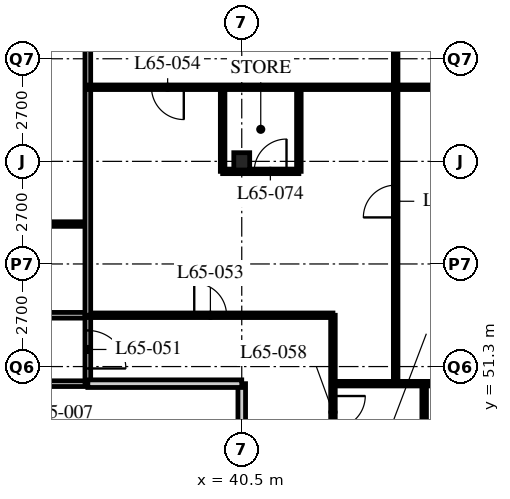
"""IFC4 building model, lengths in metres.
Left out: names, types, materials, properties, quantities, classifications, styles, units other than length and angle.
Written with IfcOpenShell. Run it as: python <this file> out.ifc"""

import sys

from ifc_helpers import new_model, si_unit, direction, frame, frame_2d, origin, origin_2d, place, context, subcontext, project, spatial, rectangle, i_section, extrude, element, fill, save


model = new_model("IFC4")
c1 = context("Model", 3, precision=1e-05, world=origin(), true_north=direction((0.0, 1.0)))
c2 = subcontext(c1, "Body", "Model", "MODEL_VIEW")
j1 = project(units=[si_unit("LENGTHUNIT", "METRE"), si_unit("PLANEANGLEUNIT", "RADIAN")], contexts=[c1])
p1 = place(None, origin())
s1 = spatial("IfcSite", under=j1, at=p1, CompositionType="ELEMENT")
p2 = place(p1, origin())
s2 = spatial("IfcBuilding", under=s1, at=p2, CompositionType="ELEMENT")
p3 = place(p2, frame((0.0, 0.0, 254.1)))
s3 = spatial("IfcBuildingStorey", under=s2, at=p3, CompositionType="ELEMENT", Elevation=254.1)
p4 = place(p3, frame((40.5, 56.7, 0.0), z_axis=(0.0, 0.0, 1.0), x_axis=(1.0, 0.0, 0.0)))
e1 = element("IfcColumn", 1, at=p4, inside=s3, PredefinedType="COLUMN", context=c2, shape_type="SweptSolid", body=[
    extrude(i_section(OverallWidth=0.418, OverallDepth=0.456, WebThickness=0.042, FlangeThickness=0.067, FilletRadius=0.015, at=origin_2d()), origin(), (0.0, 0.0, 1.0), 3.9),
])
p5 = place(p3, frame((12.15, 52.65, 0.0), z_axis=(0.0, 0.0, 1.0), x_axis=(1.0, 0.0, 0.0)))
e2 = element("IfcWall", 2, at=p5, inside=s3, PredefinedType="PARTITIONING", context=c2, shape_type="SweptSolid", body=[
    extrude(rectangle(XDim=24.3, YDim=0.15, at=frame_2d((12.15, 0.0))), origin(), (0.0, 0.0, 1.0), 3.69),
])
p6 = place(p5, frame((4.45, 0.0, 0.0)))
e3 = element("IfcOpeningElement", 3, at=p6, cuts=e2, PredefinedType="OPENING", context=c2, shape_type="SweptSolid", body=[
    extrude(rectangle(XDim=1.0, YDim=2.1, at=frame_2d((0.5, 1.05))), frame((0.0, 0.085, 0.0), z_axis=(0.0, -1.0, 0.0), x_axis=(1.0, 0.0, 0.0)), (0.0, 0.0, 1.0), 0.17),
])
p7 = place(p5, frame((1.525, 0.0, 0.0)))
e4 = element("IfcOpeningElement", 4, at=p7, cuts=e2, PredefinedType="OPENING", context=c2, shape_type="SweptSolid", body=[
    extrude(rectangle(XDim=1.0, YDim=2.1, at=frame_2d((0.5, 1.05))), frame((0.0, 0.085, 0.0), z_axis=(0.0, -1.0, 0.0), x_axis=(1.0, 0.0, 0.0)), (0.0, 0.0, 1.0), 0.17),
])
p8 = place(p3, frame((29.56, 50.85, 0.0), z_axis=(0.0, 0.0, 1.0), x_axis=(1.0, 0.0, 0.0)))
e5 = element("IfcWall", 5, at=p8, inside=s3, PredefinedType="PARTITIONING", context=c2, shape_type="SweptSolid", body=[
    extrude(rectangle(XDim=6.89, YDim=0.15, at=frame_2d((3.445, 0.0))), origin(), (0.0, 0.0, 1.0), 3.69),
])
p9 = place(p8, frame((0.657, 0.0, 0.0)))
e6 = element("IfcOpeningElement", 6, at=p9, cuts=e5, PredefinedType="OPENING", context=c2, shape_type="SweptSolid", body=[
    extrude(rectangle(XDim=1.0, YDim=2.1, at=frame_2d((0.5, 1.05))), frame((0.0, 0.085, 0.0), z_axis=(0.0, -1.0, 0.0), x_axis=(1.0, 0.0, 0.0)), (0.0, 0.0, 1.0), 0.17),
])
p10 = place(p8, frame((2.84, 0.0, 0.0)))
e7 = element("IfcOpeningElement", 7, at=p10, cuts=e5, PredefinedType="OPENING", context=c2, shape_type="SweptSolid", body=[
    extrude(rectangle(XDim=1.0, YDim=2.1, at=frame_2d((0.5, 1.05))), frame((0.0, 0.085, 0.0), z_axis=(0.0, -1.0, 0.0), x_axis=(1.0, 0.0, 0.0)), (0.0, 0.0, 1.0), 0.17),
])
p11 = place(p8, frame((4.873, 0.0, 0.0)))
e8 = element("IfcOpeningElement", 8, at=p11, cuts=e5, PredefinedType="OPENING", context=c2, shape_type="SweptSolid", body=[
    extrude(rectangle(XDim=1.0, YDim=2.1, at=frame_2d((0.5, 1.05))), frame((0.0, 0.085, 0.0), z_axis=(0.0, -1.0, 0.0), x_axis=(1.0, 0.0, 0.0)), (0.0, 0.0, 1.0), 0.17),
])
p12 = place(p3, frame((36.45, 50.85, 0.0), z_axis=(0.0, 0.0, 1.0), x_axis=(0.0, 1.0, 0.0)))
e9 = element("IfcWall", 9, at=p12, inside=s3, PredefinedType="PARTITIONING", context=c2, shape_type="SweptSolid", body=[
    extrude(rectangle(XDim=1.8, YDim=0.15, at=frame_2d((0.9, 0.0))), origin(), (0.0, 0.0, 1.0), 3.69),
])
p13 = place(p12, frame((0.4, 0.0, 0.0)))
e10 = element("IfcOpeningElement", 10, at=p13, cuts=e9, PredefinedType="OPENING", context=c2, shape_type="SweptSolid", body=[
    extrude(rectangle(XDim=1.0, YDim=2.1, at=frame_2d((0.5, 1.05))), frame((0.0, 0.085, 0.0), z_axis=(0.0, -1.0, 0.0), x_axis=(1.0, 0.0, 0.0)), (0.0, 0.0, 1.0), 0.17),
])
p14 = place(p3, frame((40.5, 40.5, 0.0), z_axis=(0.0, 0.0, 1.0), x_axis=(0.0, 1.0, 0.0)))
e11 = element("IfcWall", 11, at=p14, inside=s3, PredefinedType="SOLIDWALL", context=c2, shape_type="SweptSolid", body=[
    extrude(rectangle(XDim=10.35, YDim=0.2, at=frame_2d((5.175, 0.0))), origin(), (0.0, 0.0, 1.0), 3.078),
])
p15 = place(p3, frame((8.15, 55.05, 0.0), z_axis=(0.0, 0.0, 1.0), x_axis=(1.0, 0.0, 0.0)))
e12 = element("IfcWall", 12, at=p15, inside=s3, PredefinedType="PARTITIONING", context=c2, shape_type="SweptSolid", body=[
    extrude(rectangle(XDim=28.3, YDim=0.12, at=frame_2d((14.15, 0.0))), origin(), (0.0, 0.0, 1.0), 3.69),
])
p16 = place(p15, frame((9.025, 0.0, 0.0)))
e13 = element("IfcOpeningElement", 13, at=p16, cuts=e12, PredefinedType="OPENING", context=c2, shape_type="SweptSolid", body=[
    extrude(rectangle(XDim=0.85, YDim=2.1, at=frame_2d((0.425, 1.05))), frame((0.0, 0.07, 0.0), z_axis=(0.0, -1.0, 0.0), x_axis=(1.0, 0.0, 0.0)), (0.0, 0.0, 1.0), 0.14),
])
p17 = place(p15, frame((16.475, 0.0, 0.0)))
e14 = element("IfcOpeningElement", 14, at=p17, cuts=e12, PredefinedType="OPENING", context=c2, shape_type="SweptSolid", body=[
    extrude(rectangle(XDim=0.85, YDim=2.1, at=frame_2d((0.425, 1.05))), frame((0.0, 0.07, 0.0), z_axis=(0.0, -1.0, 0.0), x_axis=(1.0, 0.0, 0.0)), (0.0, 0.0, 1.0), 0.14),
])
p18 = place(p15, frame((20.525, 0.0, 0.0)))
e15 = element("IfcOpeningElement", 15, at=p18, cuts=e12, PredefinedType="OPENING", context=c2, shape_type="SweptSolid", body=[
    extrude(rectangle(XDim=0.85, YDim=2.1, at=frame_2d((0.425, 1.05))), frame((0.0, 0.07, 0.0), z_axis=(0.0, -1.0, 0.0), x_axis=(1.0, 0.0, 0.0)), (0.0, 0.0, 1.0), 0.14),
])
p19 = place(p15, frame((24.575, 0.0, 0.0)))
e16 = element("IfcOpeningElement", 16, at=p19, cuts=e12, PredefinedType="OPENING", context=c2, shape_type="SweptSolid", body=[
    extrude(rectangle(XDim=0.85, YDim=2.1, at=frame_2d((0.425, 1.05))), frame((0.0, 0.07, 0.0), z_axis=(0.0, -1.0, 0.0), x_axis=(1.0, 0.0, 0.0)), (0.0, 0.0, 1.0), 0.14),
])
p20 = place(p15, frame((6.725, 0.0, 0.0)))
e17 = element("IfcOpeningElement", 17, at=p20, cuts=e12, PredefinedType="OPENING", context=c2, shape_type="SweptSolid", body=[
    extrude(rectangle(XDim=0.85, YDim=2.1, at=frame_2d((0.425, 1.05))), frame((0.0, 0.07, 0.0), z_axis=(0.0, -1.0, 0.0), x_axis=(1.0, 0.0, 0.0)), (0.0, 0.0, 1.0), 0.14),
])
p21 = place(p15, frame((2.875, 0.0, 0.0)))
e18 = element("IfcOpeningElement", 18, at=p21, cuts=e12, PredefinedType="OPENING", context=c2, shape_type="SweptSolid", body=[
    extrude(rectangle(XDim=0.85, YDim=2.1, at=frame_2d((0.425, 1.05))), frame((0.0, 0.07, 0.0), z_axis=(0.0, -1.0, 0.0), x_axis=(1.0, 0.0, 0.0)), (0.0, 0.0, 1.0), 0.14),
])
p22 = place(p3, frame((42.9, 52.65, 0.0), z_axis=(0.0, 0.0, 1.0), x_axis=(0.0, -1.0, 0.0)))
e19 = element("IfcWall", 19, at=p22, inside=s3, PredefinedType="PARTITIONING", context=c2, shape_type="SweptSolid", body=[
    extrude(rectangle(XDim=16.2, YDim=0.12, at=frame_2d((8.1, 0.0))), origin(), (0.0, 0.0, 1.0), 3.69),
])
p23 = place(p22, frame((2.125, 0.0, 0.0)))
e20 = element("IfcOpeningElement", 20, at=p23, cuts=e19, PredefinedType="OPENING", context=c2, shape_type="SweptSolid", body=[
    extrude(rectangle(XDim=0.85, YDim=2.1, at=frame_2d((0.425, 1.05))), frame((0.0, 0.07, 0.0), z_axis=(0.0, -1.0, 0.0), x_axis=(1.0, 0.0, 0.0)), (0.0, 0.0, 1.0), 0.14),
])
p24 = place(p22, frame((8.425, 0.0, 0.0)))
e21 = element("IfcOpeningElement", 21, at=p24, cuts=e19, PredefinedType="OPENING", context=c2, shape_type="SweptSolid", body=[
    extrude(rectangle(XDim=0.85, YDim=2.1, at=frame_2d((0.425, 1.05))), frame((0.0, 0.07, 0.0), z_axis=(0.0, -1.0, 0.0), x_axis=(1.0, 0.0, 0.0)), (0.0, 0.0, 1.0), 0.14),
])
p25 = place(p22, frame((12.475, 0.0, 0.0)))
e22 = element("IfcOpeningElement", 22, at=p25, cuts=e19, PredefinedType="OPENING", context=c2, shape_type="SweptSolid", body=[
    extrude(rectangle(XDim=0.85, YDim=2.1, at=frame_2d((0.425, 1.05))), frame((0.0, 0.07, 0.0), z_axis=(0.0, -1.0, 0.0), x_axis=(1.0, 0.0, 0.0)), (0.0, 0.0, 1.0), 0.14),
])
p26 = place(p3, frame((36.45, 52.65, 0.0), z_axis=(0.0, 0.0, 1.0), x_axis=(1.0, 0.0, 0.0)))
e23 = element("IfcWall", 23, at=p26, inside=s3, PredefinedType="PARTITIONING", context=c2, shape_type="SweptSolid", body=[
    extrude(rectangle(XDim=6.45, YDim=0.12, at=frame_2d((3.225, 0.0))), origin(), (0.0, 0.0, 1.0), 3.69),
])
p27 = place(p26, frame((2.8, 0.0, 0.0)))
e24 = element("IfcOpeningElement", 24, at=p27, cuts=e23, PredefinedType="OPENING", context=c2, shape_type="SweptSolid", body=[
    extrude(rectangle(XDim=0.85, YDim=2.1, at=frame_2d((0.425, 1.05))), frame((0.0, 0.07, 0.0), z_axis=(0.0, -1.0, 0.0), x_axis=(1.0, 0.0, 0.0)), (0.0, 0.0, 1.0), 0.14),
])
p28 = place(p3, frame((36.45, 50.85, 0.0), z_axis=(0.0, 0.0, 1.0), x_axis=(1.0, 0.0, 0.0)))
e25 = element("IfcWall", 25, at=p28, inside=s3, PredefinedType="SOLIDWALL", context=c2, shape_type="SweptSolid", body=[
    extrude(rectangle(XDim=4.05, YDim=0.2, at=frame_2d((2.025, 0.0))), origin(), (0.0, 0.0, 1.0), 3.69),
])
p29 = place(p3, frame((42.9, 50.85, 0.0), z_axis=(0.0, 0.0, 1.0), x_axis=(1.0, 0.0, 0.0)))
e26 = element("IfcWall", 26, at=p29, inside=s3, PredefinedType="PARTITIONING", context=c2, shape_type="SweptSolid", body=[
    extrude(rectangle(XDim=13.5, YDim=0.12, at=frame_2d((6.75, 0.0))), origin(), (0.0, 0.0, 1.0), 3.69),
])
p30 = place(p3, frame((36.45, 64.5, 0.0), z_axis=(0.0, 0.0, 1.0), x_axis=(0.0, -1.0, 0.0)))
e27 = element("IfcWall", 27, at=p30, inside=s3, PredefinedType="PARTITIONING", context=c2, shape_type="SweptSolid", body=[
    extrude(rectangle(XDim=11.85, YDim=0.15, at=frame_2d((5.925, 0.0))), origin(), (0.0, 0.0, 1.0), 3.69),
])
p31 = place(p3, frame((36.45, 58.65, 0.0), z_axis=(0.0, 0.0, 1.0), x_axis=(1.0, 0.0, 0.0)))
e28 = element("IfcWall", 28, at=p31, inside=s3, PredefinedType="PARTITIONING", context=c2, shape_type="SweptSolid", body=[
    extrude(rectangle(XDim=15.9, YDim=0.12, at=frame_2d((7.95, 0.0))), origin(), (0.0, 0.0, 1.0), 3.69),
])
p32 = place(p31, frame((1.675, 0.0, 0.0)))
e29 = element("IfcOpeningElement", 29, at=p32, cuts=e28, PredefinedType="OPENING", context=c2, shape_type="SweptSolid", body=[
    extrude(rectangle(XDim=0.85, YDim=2.1, at=frame_2d((0.425, 1.05))), frame((0.0, 0.07, 0.0), z_axis=(0.0, -1.0, 0.0), x_axis=(1.0, 0.0, 0.0)), (0.0, 0.0, 1.0), 0.14),
])
p33 = place(p3, frame((44.55, 64.5, 0.0), z_axis=(0.0, 0.0, 1.0), x_axis=(0.0, -1.0, 0.0)))
e30 = element("IfcWall", 30, at=p33, inside=s3, PredefinedType="PARTITIONING", context=c2, shape_type="SweptSolid", body=[
    extrude(rectangle(XDim=13.65, YDim=0.12, at=frame_2d((6.825, 0.0))), origin(), (0.0, 0.0, 1.0), 3.69),
])
p34 = place(p33, frame((8.425, 0.0, 0.0)))
e31 = element("IfcOpeningElement", 31, at=p34, cuts=e30, PredefinedType="OPENING", context=c2, shape_type="SweptSolid", body=[
    extrude(rectangle(XDim=0.85, YDim=2.1, at=frame_2d((0.425, 1.05))), frame((0.0, 0.07, 0.0), z_axis=(0.0, -1.0, 0.0), x_axis=(1.0, 0.0, 0.0)), (0.0, 0.0, 1.0), 0.14),
])
p35 = place(p33, frame((2.5, 0.0, 0.0)))
e32 = element("IfcOpeningElement", 32, at=p35, cuts=e30, PredefinedType="OPENING", context=c2, shape_type="SweptSolid", body=[
    extrude(rectangle(XDim=0.85, YDim=2.1, at=frame_2d((0.425, 1.05))), frame((0.0, 0.07, 0.0), z_axis=(0.0, -1.0, 0.0), x_axis=(1.0, 0.0, 0.0)), (0.0, 0.0, 1.0), 0.14),
])
p36 = place(p3, frame((45.3, 50.85, 0.0), z_axis=(0.0, 0.0, 1.0), x_axis=(0.0, -1.0, 0.0)))
e33 = element("IfcWall", 33, at=p36, inside=s3, PredefinedType="PARTITIONING", context=c2, shape_type="SweptSolid", body=[
    extrude(rectangle(XDim=4.01, YDim=0.12, at=frame_2d((2.005, 0.0))), origin(), (0.0, 0.0, 1.0), 3.69),
])
p37 = place(p36, frame((2.885, 0.0, 0.0)))
e34 = element("IfcOpeningElement", 34, at=p37, cuts=e33, PredefinedType="OPENING", context=c2, shape_type="SweptSolid", body=[
    extrude(rectangle(XDim=0.85, YDim=2.1, at=frame_2d((0.425, 1.05))), frame((0.0, 0.07, 0.0), z_axis=(0.0, -1.0, 0.0), x_axis=(1.0, 0.0, 0.0)), (0.0, 0.0, 1.0), 0.14),
])
for number, where, z_axis, x_axis in (
    (35, (39.997, 58.65, 0.0), (0.0, 0.0, 1.0), (0.0, -1.0, 0.0)),
    (36, (42.003, 58.65, 0.0), (0.0, 0.0, 1.0), (0.0, -1.0, 0.0)),
):
    element("IfcWall", number, at=place(p3, frame(where, z_axis=z_axis, x_axis=x_axis)), inside=s3, PredefinedType="PARTITIONING", context=c2, shape_type="SweptSolid", body=[
        extrude(rectangle(XDim=2.213, YDim=0.12, at=frame_2d((1.106, 0.0))), origin(), (0.0, 0.0, 1.0), 3.69),
    ])
p38 = place(p3, frame((39.997, 56.437, 0.0), z_axis=(0.0, 0.0, 1.0), x_axis=(1.0, 0.0, 0.0)))
e37 = element("IfcWall", 37, at=p38, inside=s3, PredefinedType="PARTITIONING", context=c2, shape_type="SweptSolid", body=[
    extrude(rectangle(XDim=2.006, YDim=0.12, at=frame_2d((1.003, 0.0))), origin(), (0.0, 0.0, 1.0), 3.69),
])
p39 = place(p38, frame((0.831, 0.0, 0.0)))
e38 = element("IfcOpeningElement", 38, at=p39, cuts=e37, PredefinedType="OPENING", context=c2, shape_type="SweptSolid", body=[
    extrude(rectangle(XDim=0.85, YDim=2.1, at=frame_2d((0.425, 1.05))), frame((0.0, 0.07, 0.0), z_axis=(0.0, -1.0, 0.0), x_axis=(1.0, 0.0, 0.0)), (0.0, 0.0, 1.0), 0.14),
])
p40 = place(p13, origin())
e39 = element("IfcDoor", 39, at=p40, inside=s3, OperationType="SINGLE_SWING_RIGHT", PredefinedType="DOOR", context=c2, shape_type="SweptSolid", body=[
    extrude(rectangle(XDim=1.0, YDim=2.1, at=frame_2d((0.5, 1.05))), frame((0.0, 0.025, 0.0), z_axis=(0.0, -1.0, 0.0), x_axis=(1.0, 0.0, 0.0)), (0.0, 0.0, 1.0), 0.05),
])
fill(e10, e39)
p41 = place(p27, origin())
e40 = element("IfcDoor", 40, at=p41, inside=s3, OperationType="SINGLE_SWING_LEFT", PredefinedType="DOOR", context=c2, shape_type="SweptSolid", body=[
    extrude(rectangle(XDim=0.85, YDim=2.1, at=frame_2d((0.425, 1.05))), frame((0.0, 0.025, 0.0), z_axis=(0.0, -1.0, 0.0), x_axis=(1.0, 0.0, 0.0)), (0.0, 0.0, 1.0), 0.05),
])
fill(e24, e40)
p42 = place(p32, origin())
e41 = element("IfcDoor", 41, at=p42, inside=s3, OperationType="SINGLE_SWING_LEFT", PredefinedType="DOOR", context=c2, shape_type="SweptSolid", body=[
    extrude(rectangle(XDim=0.85, YDim=2.1, at=frame_2d((0.425, 1.05))), frame((0.0, 0.025, 0.0), z_axis=(0.0, -1.0, 0.0), x_axis=(1.0, 0.0, 0.0)), (0.0, 0.0, 1.0), 0.05),
])
fill(e29, e41)
p43 = place(p34, origin())
e42 = element("IfcDoor", 42, at=p43, inside=s3, OperationType="SINGLE_SWING_LEFT", PredefinedType="DOOR", context=c2, shape_type="SweptSolid", body=[
    extrude(rectangle(XDim=0.85, YDim=2.1, at=frame_2d((0.425, 1.05))), frame((0.0, 0.025, 0.0), z_axis=(0.0, -1.0, 0.0), x_axis=(1.0, 0.0, 0.0)), (0.0, 0.0, 1.0), 0.05),
])
fill(e31, e42)
p44 = place(p23, origin())
e43 = element("IfcDoor", 43, at=p44, inside=s3, OperationType="SINGLE_SWING_LEFT", PredefinedType="DOOR", context=c2, shape_type="SweptSolid", body=[
    extrude(rectangle(XDim=0.85, YDim=2.1, at=frame_2d((0.425, 1.05))), frame((0.0, 0.025, 0.0), z_axis=(0.0, -1.0, 0.0), x_axis=(1.0, 0.0, 0.0)), (0.0, 0.0, 1.0), 0.05),
])
fill(e20, e43)
p45 = place(p39, origin())
e44 = element("IfcDoor", 44, at=p45, inside=s3, OperationType="SINGLE_SWING_RIGHT", PredefinedType="DOOR", context=c2, shape_type="SweptSolid", body=[
    extrude(rectangle(XDim=0.85, YDim=2.1, at=frame_2d((0.425, 1.05))), frame((0.0, 0.025, 0.0), z_axis=(0.0, -1.0, 0.0), x_axis=(1.0, 0.0, 0.0)), (0.0, 0.0, 1.0), 0.05),
])
fill(e38, e44)
save(model, sys.argv[1])
